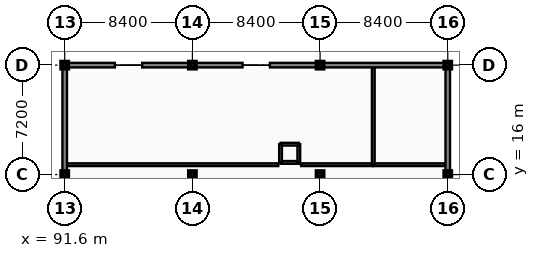
"""IFC4 building model, lengths in metres.
Left out: names, types, materials, properties, quantities, classifications, styles, units other than length and angle.
Written with IfcOpenShell. Run it as: python <this file> out.ifc"""

import sys

from ifc_helpers import new_model, si_unit, direction, frame, frame_2d, origin, origin_2d, place, context, subcontext, project, spatial, rectangle, extrude, element, fill, save


model = new_model("IFC4")
c1 = context("Model", 3, precision=1e-05, world=origin(), true_north=direction((0.0, 1.0)))
c2 = subcontext(c1, "Body", "Model", "MODEL_VIEW")
j1 = project(units=[si_unit("LENGTHUNIT", "METRE"), si_unit("PLANEANGLEUNIT", "RADIAN")], contexts=[c1])
p1 = place(None, origin())
s1 = spatial("IfcSite", under=j1, at=p1, CompositionType="ELEMENT")
p2 = place(p1, origin())
s2 = spatial("IfcBuilding", under=s1, at=p2, CompositionType="ELEMENT")
p3 = place(p2, frame((0.0, 0.0, 9.6)))
s3 = spatial("IfcBuildingStorey", under=s2, at=p3, CompositionType="ELEMENT", Elevation=9.6)
for number, where, z_axis, x_axis in (
    (1, (91.6, 16.0, 0.0), (0.0, 0.0, 1.0), (1.0, 0.0, 0.0)),
    (2, (91.6, 23.2, 0.0), (0.0, 0.0, 1.0), (1.0, 0.0, 0.0)),
    (3, (100.0, 16.0, 0.0), (0.0, 0.0, 1.0), (1.0, 0.0, 0.0)),
    (4, (100.0, 23.2, 0.0), (0.0, 0.0, 1.0), (1.0, 0.0, 0.0)),
    (5, (108.4, 16.0, 0.0), (0.0, 0.0, 1.0), (1.0, 0.0, 0.0)),
    (6, (108.4, 23.2, 0.0), (0.0, 0.0, 1.0), (1.0, 0.0, 0.0)),
    (7, (116.8, 16.0, 0.0), (0.0, 0.0, 1.0), (1.0, 0.0, 0.0)),
    (8, (116.8, 23.2, 0.0), (0.0, 0.0, 1.0), (1.0, 0.0, 0.0)),
):
    element("IfcColumn", number, at=place(p3, frame(where, z_axis=z_axis, x_axis=x_axis)), inside=s3, PredefinedType="COLUMN", context=c2, shape_type="SweptSolid", body=[
        extrude(rectangle(XDim=0.4, YDim=0.4, at=origin_2d()), origin(), (0.0, 0.0, 1.0), 4.2),
    ])
p4 = place(p3, frame((91.74, 16.65, 0.0), z_axis=(0.0, 0.0, 1.0), x_axis=(1.0, 0.0, 0.0)))
e9 = element("IfcWall", 9, at=p4, inside=s3, PredefinedType="PARTITIONING", context=c2, shape_type="SweptSolid", body=[
    extrude(rectangle(XDim=13.91, YDim=0.18, at=frame_2d((6.955, 0.0))), origin(), (0.0, 0.0, 1.0), 3.47),
])
p5 = place(p4, frame((5.54, 0.0, -0.01)))
e10 = element("IfcOpeningElement", 10, at=p5, cuts=e9, PredefinedType="OPENING", context=c2, shape_type="SweptSolid", body=[
    extrude(rectangle(XDim=1.6, YDim=2.21, at=frame_2d((0.8, 1.105))), frame((0.0, 0.1, 0.0), z_axis=(0.0, -1.0, 0.0), x_axis=(1.0, 0.0, 0.0)), (0.0, 0.0, 1.0), 0.2),
])
p6 = place(p3, frame((107.15, 16.65, 0.0), z_axis=(0.0, 0.0, 1.0), x_axis=(1.0, 0.0, 0.0)))
e11 = element("IfcWall", 11, at=p6, inside=s3, PredefinedType="PARTITIONING", context=c2, shape_type="SweptSolid", body=[
    extrude(rectangle(XDim=4.75, YDim=0.18, at=frame_2d((2.375, 0.0))), origin(), (0.0, 0.0, 1.0), 3.47),
])
p7 = place(p3, frame((111.9, 16.65, 0.0), z_axis=(0.0, 0.0, 1.0), x_axis=(1.0, 0.0, 0.0)))
e12 = element("IfcWall", 12, at=p7, inside=s3, PredefinedType="PARTITIONING", context=c2, shape_type="SweptSolid", body=[
    extrude(rectangle(XDim=4.76, YDim=0.18, at=frame_2d((2.38, 0.0))), origin(), (0.0, 0.0, 1.0), 3.59),
])
p8 = place(p7, frame((1.88, 0.0, -0.01)))
e13 = element("IfcOpeningElement", 13, at=p8, cuts=e12, PredefinedType="OPENING", context=c2, shape_type="SweptSolid", body=[
    extrude(rectangle(XDim=1.0, YDim=2.16, at=frame_2d((0.5, 1.08))), frame((0.0, 0.1, 0.0), z_axis=(0.0, -1.0, 0.0), x_axis=(1.0, 0.0, 0.0)), (0.0, 0.0, 1.0), 0.2),
])
p9 = place(p3, frame((111.9, 16.65, 0.0), z_axis=(0.0, 0.0, 1.0), x_axis=(0.0, 1.0, 0.0)))
e14 = element("IfcWall", 14, at=p9, inside=s3, PredefinedType="PARTITIONING", context=c2, shape_type="SweptSolid", body=[
    extrude(rectangle(XDim=6.41, YDim=0.18, at=frame_2d((3.205, 0.0))), origin(), (0.0, 0.0, 1.0), 3.63),
])
p10 = place(p3, frame((100.0, 23.2, 0.0), z_axis=(0.0, 0.0, 1.0), x_axis=(-1.0, 0.0, 0.0)))
e15 = element("IfcWall", 15, at=p10, inside=s3, PredefinedType="SOLIDWALL", context=c2, shape_type="SweptSolid", body=[
    extrude(rectangle(XDim=3.3, YDim=0.3, at=frame_2d((1.65, 0.0))), origin(), (0.0, 0.0, 1.0), 3.47),
])
for number, where, z_axis, x_axis in (
    (16, (94.9, 23.2, 0.0), (0.0, 0.0, 1.0), (-1.0, 0.0, 0.0)),
    (17, (108.4, 23.2, 0.0), (0.0, 0.0, 1.0), (-1.0, 0.0, 0.0)),
):
    element("IfcWall", number, at=place(p3, frame(where, z_axis=z_axis, x_axis=x_axis)), inside=s3, PredefinedType="SOLIDWALL", context=c2, shape_type="SweptSolid", body=[
        extrude(rectangle(XDim=3.3, YDim=0.3, at=frame_2d((1.65, 0.0))), origin(), (0.0, 0.0, 1.0), 3.47),
    ])
p11 = place(p3, frame((103.3, 23.2, 0.0), z_axis=(0.0, 0.0, 1.0), x_axis=(-1.0, 0.0, 0.0)))
e18 = element("IfcWall", 18, at=p11, inside=s3, PredefinedType="SOLIDWALL", context=c2, shape_type="SweptSolid", body=[
    extrude(rectangle(XDim=3.3, YDim=0.3, at=frame_2d((1.65, 0.0))), origin(), (0.0, 0.0, 1.0), 3.47),
])
p12 = place(p3, frame((116.8, 23.2, 0.0), z_axis=(0.0, 0.0, 1.0), x_axis=(-1.0, 0.0, 0.0)))
e19 = element("IfcWall", 19, at=p12, inside=s3, PredefinedType="SOLIDWALL", context=c2, shape_type="SweptSolid", body=[
    extrude(rectangle(XDim=8.4, YDim=0.3, at=frame_2d((4.2, 0.0))), origin(), (0.0, 0.0, 1.0), 3.47),
])
p13 = place(p12, frame((0.46, 0.0, 0.85)))
e20 = element("IfcOpeningElement", 20, at=p13, cuts=e19, PredefinedType="OPENING", context=c2, shape_type="SweptSolid", body=[
    extrude(rectangle(XDim=0.9, YDim=2.1, at=frame_2d((0.45, 1.05))), frame((0.0, 0.16, 0.0), z_axis=(0.0, -1.0, 0.0), x_axis=(1.0, 0.0, 0.0)), (0.0, 0.0, 1.0), 0.32),
])
p14 = place(p12, frame((6.86, 0.0, 0.85)))
e21 = element("IfcOpeningElement", 21, at=p14, cuts=e19, PredefinedType="OPENING", context=c2, shape_type="SweptSolid", body=[
    extrude(rectangle(XDim=0.9, YDim=2.1, at=frame_2d((0.45, 1.05))), frame((0.0, 0.16, 0.0), z_axis=(0.0, -1.0, 0.0), x_axis=(1.0, 0.0, 0.0)), (0.0, 0.0, 1.0), 0.32),
])
p15 = place(p3, frame((91.6, 16.0, 0.0), z_axis=(0.0, 0.0, 1.0), x_axis=(0.0, -1.0, 0.0)))
e22 = element("IfcWall", 22, at=p15, inside=s3, PredefinedType="SOLIDWALL", context=c2, shape_type="SweptSolid", body=[
    extrude(rectangle(XDim=2.7, YDim=0.3, at=frame_2d((1.35, 0.0))), origin(), (0.0, 0.0, 1.0), 3.27),
])
p16 = place(p3, frame((91.6, 23.2, 0.0), z_axis=(0.0, 0.0, 1.0), x_axis=(0.0, -1.0, 0.0)))
e23 = element("IfcWall", 23, at=p16, inside=s3, PredefinedType="SOLIDWALL", context=c2, shape_type="SweptSolid", body=[
    extrude(rectangle(XDim=7.2, YDim=0.3, at=frame_2d((3.6, 0.0))), origin(), (0.0, 0.0, 1.0), 3.27),
])
p17 = place(p16, frame((0.46, 0.0, 0.85)))
e24 = element("IfcOpeningElement", 24, at=p17, cuts=e23, PredefinedType="OPENING", context=c2, shape_type="SweptSolid", body=[
    extrude(rectangle(XDim=0.9, YDim=2.1, at=frame_2d((0.45, 1.05))), frame((0.0, 0.16, 0.0), z_axis=(0.0, -1.0, 0.0), x_axis=(1.0, 0.0, 0.0)), (0.0, 0.0, 1.0), 0.32),
])
p18 = place(p16, frame((5.26, 0.0, 0.85)))
e25 = element("IfcOpeningElement", 25, at=p18, cuts=e23, PredefinedType="OPENING", context=c2, shape_type="SweptSolid", body=[
    extrude(rectangle(XDim=0.9, YDim=2.1, at=frame_2d((0.45, 1.05))), frame((0.0, 0.16, 0.0), z_axis=(0.0, -1.0, 0.0), x_axis=(1.0, 0.0, 0.0)), (0.0, 0.0, 1.0), 0.32),
])
p19 = place(p3, frame((116.8, 8.8, 0.0), z_axis=(0.0, 0.0, 1.0), x_axis=(0.0, 1.0, 0.0)))
e26 = element("IfcWall", 26, at=p19, inside=s3, PredefinedType="SOLIDWALL", context=c2, shape_type="SweptSolid", body=[
    extrude(rectangle(XDim=7.2, YDim=0.3, at=frame_2d((3.6, 0.0))), origin(), (0.0, 0.0, 1.0), 3.27),
])
p20 = place(p19, frame((0.46, 0.0, 0.85)))
e27 = element("IfcOpeningElement", 27, at=p20, cuts=e26, PredefinedType="OPENING", context=c2, shape_type="SweptSolid", body=[
    extrude(rectangle(XDim=0.9, YDim=2.1, at=frame_2d((0.45, 1.05))), frame((0.0, 0.16, 0.0), z_axis=(0.0, -1.0, 0.0), x_axis=(1.0, 0.0, 0.0)), (0.0, 0.0, 1.0), 0.32),
])
p21 = place(p19, frame((5.66, 0.0, 0.85)))
e28 = element("IfcOpeningElement", 28, at=p21, cuts=e26, PredefinedType="OPENING", context=c2, shape_type="SweptSolid", body=[
    extrude(rectangle(XDim=0.9, YDim=2.1, at=frame_2d((0.45, 1.05))), frame((0.0, 0.16, 0.0), z_axis=(0.0, -1.0, 0.0), x_axis=(1.0, 0.0, 0.0)), (0.0, 0.0, 1.0), 0.32),
])
p22 = place(p3, frame((116.8, 16.0, 0.0), z_axis=(0.0, 0.0, 1.0), x_axis=(0.0, 1.0, 0.0)))
e29 = element("IfcWall", 29, at=p22, inside=s3, PredefinedType="SOLIDWALL", context=c2, shape_type="SweptSolid", body=[
    extrude(rectangle(XDim=7.2, YDim=0.3, at=frame_2d((3.6, 0.0))), origin(), (0.0, 0.0, 1.0), 3.27),
])
p23 = place(p22, frame((0.86, 0.0, 0.85)))
e30 = element("IfcOpeningElement", 30, at=p23, cuts=e29, PredefinedType="OPENING", context=c2, shape_type="SweptSolid", body=[
    extrude(rectangle(XDim=0.9, YDim=2.1, at=frame_2d((0.45, 1.05))), frame((0.0, 0.16, 0.0), z_axis=(0.0, -1.0, 0.0), x_axis=(1.0, 0.0, 0.0)), (0.0, 0.0, 1.0), 0.32),
])
p24 = place(p22, frame((5.66, 0.0, 0.85)))
e31 = element("IfcOpeningElement", 31, at=p24, cuts=e29, PredefinedType="OPENING", context=c2, shape_type="SweptSolid", body=[
    extrude(rectangle(XDim=0.9, YDim=2.1, at=frame_2d((0.45, 1.05))), frame((0.0, 0.16, 0.0), z_axis=(0.0, -1.0, 0.0), x_axis=(1.0, 0.0, 0.0)), (0.0, 0.0, 1.0), 0.32),
])
p25 = place(p3, frame((105.8, 16.8, 0.0), z_axis=(0.0, 0.0, 1.0), x_axis=(1.0, 0.0, 0.0)))
e32 = element("IfcWall", 32, at=p25, inside=s3, PredefinedType="SOLIDWALL", context=c2, shape_type="SweptSolid", body=[
    extrude(rectangle(XDim=1.2, YDim=0.18, at=frame_2d((0.6, 0.0))), origin(), (0.0, 0.0, 1.0), 3.97),
])
p26 = place(p25, frame((0.2, 0.0, -0.01)))
e33 = element("IfcOpeningElement", 33, at=p26, cuts=e32, PredefinedType="OPENING", context=c2, shape_type="SweptSolid", body=[
    extrude(rectangle(XDim=0.8, YDim=2.06, at=frame_2d((0.4, 1.03))), frame((0.0, 0.1, 0.0), z_axis=(0.0, -1.0, 0.0), x_axis=(1.0, 0.0, 0.0)), (0.0, 0.0, 1.0), 0.2),
])
for number, where, z_axis, x_axis in (
    (34, (107.0, 16.8, 0.0), (0.0, 0.0, 1.0), (0.0, 1.0, 0.0)),
    (35, (107.0, 18.0, 0.0), (0.0, 0.0, 1.0), (-1.0, 0.0, 0.0)),
    (36, (105.8, 18.0, 0.0), (0.0, 0.0, 1.0), (0.0, -1.0, 0.0)),
):
    element("IfcWall", number, at=place(p3, frame(where, z_axis=z_axis, x_axis=x_axis)), inside=s3, PredefinedType="SOLIDWALL", context=c2, shape_type="SweptSolid", body=[
        extrude(rectangle(XDim=1.2, YDim=0.18, at=frame_2d((0.6, 0.0))), origin(), (0.0, 0.0, 1.0), 3.97),
    ])
p27 = place(p5, frame((1.6, 0.0, 0.01), z_axis=(0.0, 0.0, 1.0), x_axis=(-1.0, 0.0, 0.0)))
e37 = element("IfcDoor", 37, at=p27, inside=s3, OperationType="DOUBLE_SWING_LEFT", PredefinedType="DOOR", context=c2, shape_type="SweptSolid", body=[
    extrude(rectangle(XDim=1.6, YDim=2.2, at=frame_2d((0.8, 1.1))), frame((0.0, 0.025, 0.0), z_axis=(0.0, -1.0, 0.0), x_axis=(1.0, 0.0, 0.0)), (0.0, 0.0, 1.0), 0.05),
])
fill(e10, e37)
p28 = place(p8, frame((0.0, 0.0, 0.01)))
e38 = element("IfcDoor", 38, at=p28, inside=s3, OperationType="SINGLE_SWING_LEFT", PredefinedType="DOOR", context=c2, shape_type="SweptSolid", body=[
    extrude(rectangle(XDim=1.0, YDim=2.15, at=frame_2d((0.5, 1.075))), frame((0.0, 0.025, 0.0), z_axis=(0.0, -1.0, 0.0), x_axis=(1.0, 0.0, 0.0)), (0.0, 0.0, 1.0), 0.05),
])
fill(e13, e38)
p29 = place(p13, origin())
e39 = element("IfcWindow", 39, at=p29, inside=s3, PartitioningType="SINGLE_PANEL", PredefinedType="WINDOW", context=c2, shape_type="SweptSolid", body=[
    extrude(rectangle(XDim=0.9, YDim=2.1, at=frame_2d((0.45, 1.05))), frame((0.0, 0.03, 0.0), z_axis=(0.0, -1.0, 0.0), x_axis=(1.0, 0.0, 0.0)), (0.0, 0.0, 1.0), 0.06),
])
fill(e20, e39)
p30 = place(p14, origin())
e40 = element("IfcWindow", 40, at=p30, inside=s3, PartitioningType="SINGLE_PANEL", PredefinedType="WINDOW", context=c2, shape_type="SweptSolid", body=[
    extrude(rectangle(XDim=0.9, YDim=2.1, at=frame_2d((0.45, 1.05))), frame((0.0, 0.03, 0.0), z_axis=(0.0, -1.0, 0.0), x_axis=(1.0, 0.0, 0.0)), (0.0, 0.0, 1.0), 0.06),
])
fill(e21, e40)
p31 = place(p17, origin())
e41 = element("IfcWindow", 41, at=p31, inside=s3, PartitioningType="SINGLE_PANEL", PredefinedType="WINDOW", context=c2, shape_type="SweptSolid", body=[
    extrude(rectangle(XDim=0.9, YDim=2.1, at=frame_2d((0.45, 1.05))), frame((0.0, 0.03, 0.0), z_axis=(0.0, -1.0, 0.0), x_axis=(1.0, 0.0, 0.0)), (0.0, 0.0, 1.0), 0.06),
])
fill(e24, e41)
p32 = place(p18, origin())
e42 = element("IfcWindow", 42, at=p32, inside=s3, PartitioningType="SINGLE_PANEL", PredefinedType="WINDOW", context=c2, shape_type="SweptSolid", body=[
    extrude(rectangle(XDim=0.9, YDim=2.1, at=frame_2d((0.45, 1.05))), frame((0.0, 0.03, 0.0), z_axis=(0.0, -1.0, 0.0), x_axis=(1.0, 0.0, 0.0)), (0.0, 0.0, 1.0), 0.06),
])
fill(e25, e42)
p33 = place(p23, origin())
e43 = element("IfcWindow", 43, at=p33, inside=s3, PartitioningType="SINGLE_PANEL", PredefinedType="WINDOW", context=c2, shape_type="SweptSolid", body=[
    extrude(rectangle(XDim=0.9, YDim=2.1, at=frame_2d((0.45, 1.05))), frame((0.0, 0.03, 0.0), z_axis=(0.0, -1.0, 0.0), x_axis=(1.0, 0.0, 0.0)), (0.0, 0.0, 1.0), 0.06),
])
fill(e30, e43)
p34 = place(p24, origin())
e44 = element("IfcWindow", 44, at=p34, inside=s3, PartitioningType="SINGLE_PANEL", PredefinedType="WINDOW", context=c2, shape_type="SweptSolid", body=[
    extrude(rectangle(XDim=0.9, YDim=2.1, at=frame_2d((0.45, 1.05))), frame((0.0, 0.03, 0.0), z_axis=(0.0, -1.0, 0.0), x_axis=(1.0, 0.0, 0.0)), (0.0, 0.0, 1.0), 0.06),
])
fill(e31, e44)
p35 = place(p26, frame((0.0, 0.0, 0.01)))
e45 = element("IfcDoor", 45, at=p35, inside=s3, OperationType="SINGLE_SWING_LEFT", PredefinedType="DOOR", context=c2, shape_type="SweptSolid", body=[
    extrude(rectangle(XDim=0.8, YDim=2.05, at=frame_2d((0.4, 1.025))), frame((0.0, 0.025, 0.0), z_axis=(0.0, -1.0, 0.0), x_axis=(1.0, 0.0, 0.0)), (0.0, 0.0, 1.0), 0.05),
])
fill(e33, e45)
save(model, sys.argv[1])
